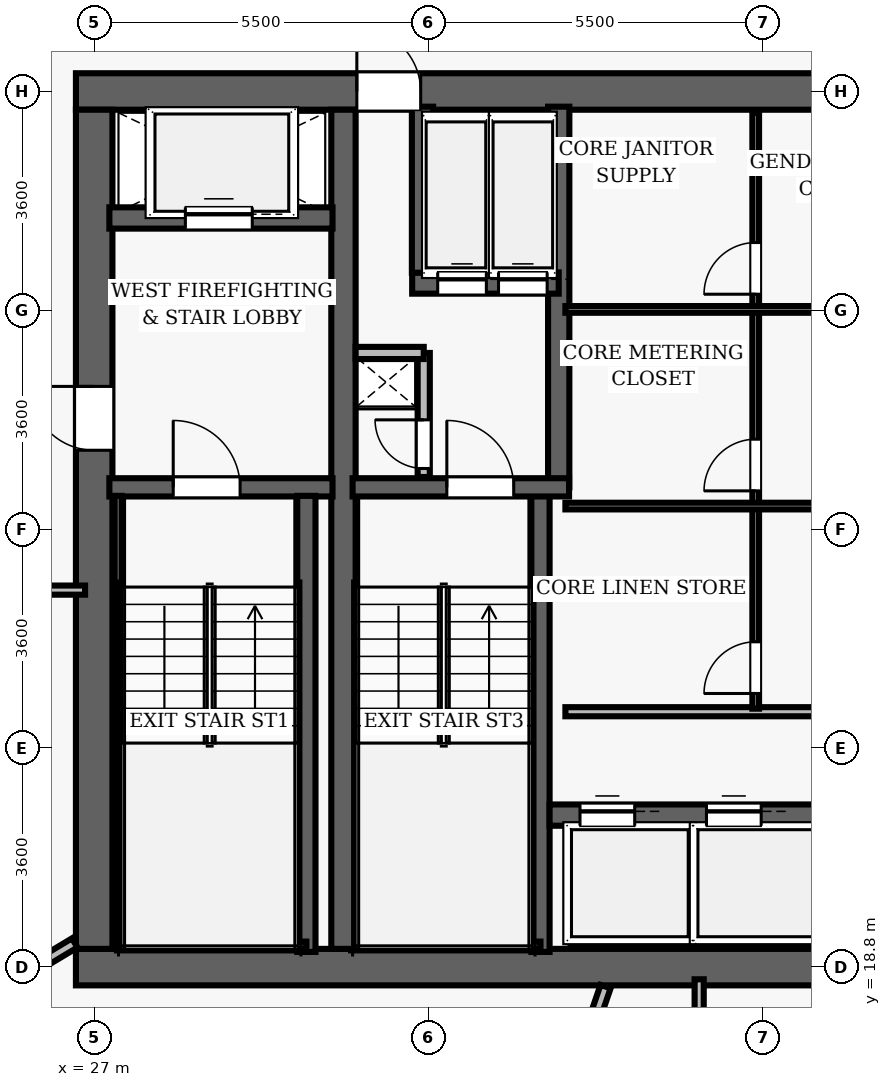
"""IFC4 building model, lengths in metres.
Left out: names, types, materials, properties, quantities, classifications, styles, units other than length and angle.
Written with IfcOpenShell. Run it as: python <this file> out.ifc"""

import sys

from ifc_helpers import new_model, si_unit, direction, frame, frame_2d, origin, place, context, subcontext, project, spatial, rectangle, extrude, element, fill, save


model = new_model("IFC4")
c1 = context("Model", 3, precision=1e-05, world=origin(), true_north=direction((0.0, 1.0)))
c2 = subcontext(c1, "Body", "Model", "MODEL_VIEW")
j1 = project(units=[si_unit("LENGTHUNIT", "METRE"), si_unit("PLANEANGLEUNIT", "RADIAN")], contexts=[c1])
p1 = place(None, origin())
s1 = spatial("IfcSite", under=j1, at=p1, CompositionType="ELEMENT")
p2 = place(p1, origin())
s2 = spatial("IfcBuilding", under=s1, at=p2, CompositionType="ELEMENT")
p3 = place(p2, frame((0.0, 0.0, 109.8)))
s3 = spatial("IfcBuildingStorey", under=s2, at=p3, CompositionType="ELEMENT", Elevation=109.8)
p4 = place(p3, frame((26.7, 18.8, 0.0), z_axis=(0.0, 0.0, 1.0), x_axis=(1.0, 0.0, 0.0)))
e1 = element("IfcWall", 1, at=p4, inside=s3, PredefinedType="SHEAR", context=c2, shape_type="SweptSolid", body=[
    extrude(rectangle(XDim=22.6, YDim=0.6, at=frame_2d((11.3, 0.0))), origin(), (0.0, 0.0, 1.0), 3.5),
])
p5 = place(p4, frame((14.52, 0.0, 0.0)))
e2 = element("IfcOpeningElement", 2, at=p5, cuts=e1, PredefinedType="OPENING", context=c2, shape_type="SweptSolid", body=[
    extrude(rectangle(XDim=1.05, YDim=2.15, at=frame_2d((0.525, 1.075))), frame((0.0, 0.31, 0.0), z_axis=(0.0, -1.0, 0.0), x_axis=(1.0, 0.0, 0.0)), (0.0, 0.0, 1.0), 0.62),
])
p6 = place(p3, frame((26.7, 33.2, 0.0), z_axis=(0.0, 0.0, 1.0), x_axis=(1.0, 0.0, 0.0)))
e3 = element("IfcWall", 3, at=p6, inside=s3, PredefinedType="SHEAR", context=c2, shape_type="SweptSolid", body=[
    extrude(rectangle(XDim=22.6, YDim=0.6, at=frame_2d((11.3, 0.0))), origin(), (0.0, 0.0, 1.0), 3.5),
])
p7 = place(p6, frame((4.62, 0.0, 0.0)))
e4 = element("IfcOpeningElement", 4, at=p7, cuts=e3, PredefinedType="OPENING", context=c2, shape_type="SweptSolid", body=[
    extrude(rectangle(XDim=1.05, YDim=2.15, at=frame_2d((0.525, 1.075))), frame((0.0, 0.31, 0.0), z_axis=(0.0, -1.0, 0.0), x_axis=(1.0, 0.0, 0.0)), (0.0, 0.0, 1.0), 0.62),
])
p8 = place(p6, frame((14.52, 0.0, 0.0)))
e5 = element("IfcOpeningElement", 5, at=p8, cuts=e3, PredefinedType="OPENING", context=c2, shape_type="SweptSolid", body=[
    extrude(rectangle(XDim=1.05, YDim=2.15, at=frame_2d((0.525, 1.075))), frame((0.0, 0.31, 0.0), z_axis=(0.0, -1.0, 0.0), x_axis=(1.0, 0.0, 0.0)), (0.0, 0.0, 1.0), 0.62),
])
p9 = place(p3, frame((27.0, 19.1, 0.0), z_axis=(0.0, 0.0, 1.0), x_axis=(0.0, 1.0, 0.0)))
e6 = element("IfcWall", 6, at=p9, inside=s3, PredefinedType="SHEAR", context=c2, shape_type="SweptSolid", body=[
    extrude(rectangle(XDim=13.8, YDim=0.6, at=frame_2d((6.9, 0.0))), origin(), (0.0, 0.0, 1.0), 3.5),
])
p10 = place(p9, frame((8.2, 0.0, 0.0)))
e7 = element("IfcOpeningElement", 7, at=p10, cuts=e6, PredefinedType="OPENING", context=c2, shape_type="SweptSolid", body=[
    extrude(rectangle(XDim=1.05, YDim=2.15, at=frame_2d((0.525, 1.075))), frame((0.0, 0.31, 0.0), z_axis=(0.0, -1.0, 0.0), x_axis=(1.0, 0.0, 0.0)), (0.0, 0.0, 1.0), 0.62),
])
p11 = place(p3, frame((31.1, 19.1, 0.0), z_axis=(0.0, 0.0, 1.0), x_axis=(0.0, 1.0, 0.0)))
e8 = element("IfcWall", 8, at=p11, inside=s3, PredefinedType="SHEAR", context=c2, shape_type="SweptSolid", body=[
    extrude(rectangle(XDim=13.8, YDim=0.4, at=frame_2d((6.9, 0.0))), origin(), (0.0, 0.0, 1.0), 3.5),
])
p12 = place(p3, frame((27.25, 26.69, 0.0), z_axis=(0.0, 0.0, 1.0), x_axis=(1.0, 0.0, 0.0)))
e9 = element("IfcWall", 9, at=p12, inside=s3, PredefinedType="SHEAR", context=c2, shape_type="SweptSolid", body=[
    extrude(rectangle(XDim=3.67, YDim=0.3, at=frame_2d((1.835, 0.0))), origin(), (0.0, 0.0, 1.0), 3.5),
])
p13 = place(p12, frame((1.05, 0.0, 0.0)))
e10 = element("IfcOpeningElement", 10, at=p13, cuts=e9, PredefinedType="OPENING", context=c2, shape_type="SweptSolid", body=[
    extrude(rectangle(XDim=1.1, YDim=2.15, at=frame_2d((0.55, 1.075))), frame((0.0, 0.16, 0.0), z_axis=(0.0, -1.0, 0.0), x_axis=(1.0, 0.0, 0.0)), (0.0, 0.0, 1.0), 0.32),
])
p14 = place(p3, frame((30.49, 19.05, 0.0), z_axis=(0.0, 0.0, 1.0), x_axis=(0.0, 1.0, 0.0)))
e11 = element("IfcWall", 11, at=p14, inside=s3, PredefinedType="SHEAR", context=c2, shape_type="SweptSolid", body=[
    extrude(rectangle(XDim=7.5, YDim=0.3, at=frame_2d((3.75, 0.0))), origin(), (0.0, 0.0, 1.0), 3.5),
])
p15 = place(p3, frame((27.395, 19.1, 0.0), z_axis=(0.0, 0.0, 1.0), x_axis=(0.0, 1.0, 0.0)))
e12 = element("IfcWall", 12, at=p15, inside=s3, PredefinedType="SHEAR", context=c2, shape_type="SweptSolid", body=[
    extrude(rectangle(XDim=7.45, YDim=0.12, at=frame_2d((3.725, 0.0))), origin(), (0.0, 0.0, 1.0), 3.5),
])
p16 = place(p3, frame((27.395, 19.16, 0.0), z_axis=(0.0, 0.0, 1.0), x_axis=(1.0, 0.0, 0.0)))
e13 = element("IfcWall", 13, at=p16, inside=s3, PredefinedType="SHEAR", context=c2, shape_type="SweptSolid", body=[
    extrude(rectangle(XDim=3.095, YDim=0.12, at=frame_2d((1.547, 0.0))), origin(), (0.0, 0.0, 1.0), 3.5),
])
p17 = place(p3, frame((27.25, 31.12, 0.0), z_axis=(0.0, 0.0, 1.0), x_axis=(1.0, 0.0, 0.0)))
e14 = element("IfcWall", 14, at=p17, inside=s3, PredefinedType="SHEAR", context=c2, shape_type="SweptSolid", body=[
    extrude(rectangle(XDim=3.67, YDim=0.35, at=frame_2d((1.835, 0.0))), origin(), (0.0, 0.0, 1.0), 2.675),
])
p18 = place(p17, frame((1.25, 0.0, 0.0)))
e15 = element("IfcOpeningElement", 15, at=p18, cuts=e14, PredefinedType="OPENING", context=c2, shape_type="SweptSolid", body=[
    extrude(rectangle(XDim=1.1, YDim=2.15, at=frame_2d((0.55, 1.075))), frame((0.0, 0.185, 0.0), z_axis=(0.0, -1.0, 0.0), x_axis=(1.0, 0.0, 0.0)), (0.0, 0.0, 1.0), 0.37),
])
p19 = place(p3, frame((34.34, 19.05, 0.0), z_axis=(0.0, 0.0, 1.0), x_axis=(0.0, 1.0, 0.0)))
e16 = element("IfcWall", 16, at=p19, inside=s3, PredefinedType="SHEAR", context=c2, shape_type="SweptSolid", body=[
    extrude(rectangle(XDim=7.5, YDim=0.3, at=frame_2d((3.75, 0.0))), origin(), (0.0, 0.0, 1.0), 3.5),
])
p20 = place(p3, frame((34.64, 26.69, 0.0), z_axis=(0.0, 0.0, 1.0), x_axis=(0.0, 1.0, 0.0)))
e17 = element("IfcWall", 17, at=p20, inside=s3, PredefinedType="SHEAR", context=c2, shape_type="SweptSolid", body=[
    extrude(rectangle(XDim=6.26, YDim=0.35, at=frame_2d((3.13, 0.0))), origin(), (0.0, 0.0, 1.0), 3.5),
])
p21 = place(p3, frame((31.25, 26.69, 0.0), z_axis=(0.0, 0.0, 1.0), x_axis=(1.0, 0.0, 0.0)))
e18 = element("IfcWall", 18, at=p21, inside=s3, PredefinedType="SHEAR", context=c2, shape_type="SweptSolid", body=[
    extrude(rectangle(XDim=3.56, YDim=0.3, at=frame_2d((1.78, 0.0))), origin(), (0.0, 0.0, 1.0), 3.5),
])
p22 = place(p21, frame((1.55, 0.0, 0.0)))
e19 = element("IfcOpeningElement", 19, at=p22, cuts=e18, PredefinedType="OPENING", context=c2, shape_type="SweptSolid", body=[
    extrude(rectangle(XDim=1.1, YDim=2.15, at=frame_2d((0.55, 1.075))), frame((0.0, 0.16, 0.0), z_axis=(0.0, -1.0, 0.0), x_axis=(1.0, 0.0, 0.0)), (0.0, 0.0, 1.0), 0.32),
])
p23 = place(p3, frame((31.3, 19.16, 0.0), z_axis=(0.0, 0.0, 1.0), x_axis=(1.0, 0.0, 0.0)))
e20 = element("IfcWall", 20, at=p23, inside=s3, PredefinedType="SHEAR", context=c2, shape_type="SweptSolid", body=[
    extrude(rectangle(XDim=3.04, YDim=0.12, at=frame_2d((1.52, 0.0))), origin(), (0.0, 0.0, 1.0), 3.5),
])
p24 = place(p3, frame((32.23, 30.05, 0.0), z_axis=(0.0, 0.0, 1.0), x_axis=(1.0, 0.0, 0.0)))
e21 = element("IfcWall", 21, at=p24, inside=s3, PredefinedType="SHEAR", context=c2, shape_type="SweptSolid", body=[
    extrude(rectangle(XDim=2.41, YDim=0.35, at=frame_2d((1.205, 0.0))), origin(), (0.0, 0.0, 1.0), 2.675),
])
p25 = place(p24, frame((0.42, 0.0, 0.0)))
e22 = element("IfcOpeningElement", 22, at=p25, cuts=e21, PredefinedType="OPENING", context=c2, shape_type="SweptSolid", body=[
    extrude(rectangle(XDim=0.8, YDim=2.15, at=frame_2d((0.4, 1.075))), frame((0.0, 0.185, 0.0), z_axis=(0.0, -1.0, 0.0), x_axis=(1.0, 0.0, 0.0)), (0.0, 0.0, 1.0), 0.37),
])
p26 = place(p24, frame((1.42, 0.0, 0.0)))
e23 = element("IfcOpeningElement", 23, at=p26, cuts=e21, PredefinedType="OPENING", context=c2, shape_type="SweptSolid", body=[
    extrude(rectangle(XDim=0.8, YDim=2.15, at=frame_2d((0.4, 1.075))), frame((0.0, 0.185, 0.0), z_axis=(0.0, -1.0, 0.0), x_axis=(1.0, 0.0, 0.0)), (0.0, 0.0, 1.0), 0.37),
])
p27 = place(p3, frame((32.4, 30.22, 0.0), z_axis=(0.0, 0.0, 1.0), x_axis=(0.0, 1.0, 0.0)))
e24 = element("IfcWall", 24, at=p27, inside=s3, PredefinedType="SHEAR", context=c2, shape_type="SweptSolid", body=[
    extrude(rectangle(XDim=2.73, YDim=0.35, at=frame_2d((1.365, 0.0))), origin(), (0.0, 0.0, 1.0), 2.675),
])
p28 = place(p3, frame((32.42, 26.86, 0.0), z_axis=(0.0, 0.0, 1.0), x_axis=(0.0, 1.0, 0.0)))
e25 = element("IfcWall", 25, at=p28, inside=s3, PredefinedType="PARTITIONING", context=c2, shape_type="SweptSolid", body=[
    extrude(rectangle(XDim=2.04, YDim=0.2, at=frame_2d((1.02, 0.0))), origin(), (0.0, 0.0, 1.0), 2.675),
])
p29 = place(p28, frame((0.14, 0.0, 0.0)))
e26 = element("IfcOpeningElement", 26, at=p29, cuts=e25, PredefinedType="OPENING", context=c2, shape_type="SweptSolid", body=[
    extrude(rectangle(XDim=0.8, YDim=2.05, at=frame_2d((0.4, 1.025))), frame((0.0, 0.11, 0.0), z_axis=(0.0, -1.0, 0.0), x_axis=(1.0, 0.0, 0.0)), (0.0, 0.0, 1.0), 0.22),
])
p30 = place(p3, frame((31.3, 28.9, 0.0), z_axis=(0.0, 0.0, 1.0), x_axis=(1.0, 0.0, 0.0)))
e27 = element("IfcWall", 27, at=p30, inside=s3, PredefinedType="PARTITIONING", context=c2, shape_type="SweptSolid", body=[
    extrude(rectangle(XDim=1.12, YDim=0.2, at=frame_2d((0.56, 0.0))), origin(), (0.0, 0.0, 1.0), 2.675),
])
p31 = place(p3, frame((34.49, 21.3, 0.0), z_axis=(0.0, 0.0, 1.0), x_axis=(1.0, 0.0, 0.0)))
e28 = element("IfcWall", 28, at=p31, inside=s3, PredefinedType="SHEAR", context=c2, shape_type="SweptSolid", body=[
    extrude(rectangle(XDim=6.68, YDim=0.35, at=frame_2d((3.34, 0.0))), origin(), (0.0, 0.0, 1.0), 2.675),
])
p32 = place(p31, frame((0.5, 0.0, 0.0)))
e29 = element("IfcOpeningElement", 29, at=p32, cuts=e28, PredefinedType="OPENING", context=c2, shape_type="SweptSolid", body=[
    extrude(rectangle(XDim=0.9, YDim=2.15, at=frame_2d((0.45, 1.075))), frame((0.0, 0.185, 0.0), z_axis=(0.0, -1.0, 0.0), x_axis=(1.0, 0.0, 0.0)), (0.0, 0.0, 1.0), 0.37),
])
p33 = place(p31, frame((2.58, 0.0, 0.0)))
e30 = element("IfcOpeningElement", 30, at=p33, cuts=e28, PredefinedType="OPENING", context=c2, shape_type="SweptSolid", body=[
    extrude(rectangle(XDim=0.9, YDim=2.15, at=frame_2d((0.45, 1.075))), frame((0.0, 0.185, 0.0), z_axis=(0.0, -1.0, 0.0), x_axis=(1.0, 0.0, 0.0)), (0.0, 0.0, 1.0), 0.37),
])
p34 = place(p31, frame((4.66, 0.0, 0.0)))
e31 = element("IfcOpeningElement", 31, at=p34, cuts=e28, PredefinedType="OPENING", context=c2, shape_type="SweptSolid", body=[
    extrude(rectangle(XDim=0.9, YDim=2.15, at=frame_2d((0.45, 1.075))), frame((0.0, 0.185, 0.0), z_axis=(0.0, -1.0, 0.0), x_axis=(1.0, 0.0, 0.0)), (0.0, 0.0, 1.0), 0.37),
])
p35 = place(p3, frame((34.75, 23.0, 0.0), z_axis=(0.0, 0.0, 1.0), x_axis=(1.0, 0.0, 0.0)))
e32 = element("IfcWall", 32, at=p35, inside=s3, PredefinedType="PARTITIONING", context=c2, shape_type="SweptSolid", body=[
    extrude(rectangle(XDim=6.25, YDim=0.15, at=frame_2d((3.125, 0.0))), origin(), (0.0, 0.0, 1.0), 2.675),
])
p36 = place(p3, frame((37.88, 23.05, 0.0), z_axis=(0.0, 0.0, 1.0), x_axis=(0.0, 1.0, 0.0)))
e33 = element("IfcWall", 33, at=p36, inside=s3, PredefinedType="PARTITIONING", context=c2, shape_type="SweptSolid", body=[
    extrude(rectangle(XDim=9.8, YDim=0.11, at=frame_2d((4.9, 0.0))), origin(), (0.0, 0.0, 1.0), 2.675),
])
p37 = place(p36, frame((0.25, 0.0, 0.0)))
e34 = element("IfcOpeningElement", 34, at=p37, cuts=e33, PredefinedType="OPENING", context=c2, shape_type="SweptSolid", body=[
    extrude(rectangle(XDim=0.85, YDim=2.1, at=frame_2d((0.425, 1.05))), frame((0.0, 0.065, 0.0), z_axis=(0.0, -1.0, 0.0), x_axis=(1.0, 0.0, 0.0)), (0.0, 0.0, 1.0), 0.13),
])
p38 = place(p36, frame((3.582, 0.0, 0.0)))
e35 = element("IfcOpeningElement", 35, at=p38, cuts=e33, PredefinedType="OPENING", context=c2, shape_type="SweptSolid", body=[
    extrude(rectangle(XDim=0.85, YDim=2.1, at=frame_2d((0.425, 1.05))), frame((0.0, 0.065, 0.0), z_axis=(0.0, -1.0, 0.0), x_axis=(1.0, 0.0, 0.0)), (0.0, 0.0, 1.0), 0.13),
])
p39 = place(p36, frame((6.816, 0.0, 0.0)))
e36 = element("IfcOpeningElement", 36, at=p39, cuts=e33, PredefinedType="OPENING", context=c2, shape_type="SweptSolid", body=[
    extrude(rectangle(XDim=0.85, YDim=2.1, at=frame_2d((0.425, 1.05))), frame((0.0, 0.065, 0.0), z_axis=(0.0, -1.0, 0.0), x_axis=(1.0, 0.0, 0.0)), (0.0, 0.0, 1.0), 0.13),
])
for number, where, z_axis, x_axis in (
    (37, (34.75, 26.382, 0.0), (0.0, 0.0, 1.0), (1.0, 0.0, 0.0)),
    (38, (34.75, 29.616, 0.0), (0.0, 0.0, 1.0), (1.0, 0.0, 0.0)),
):
    element("IfcWall", number, at=place(p3, frame(where, z_axis=z_axis, x_axis=x_axis)), inside=s3, PredefinedType="PARTITIONING", context=c2, shape_type="SweptSolid", body=[
        extrude(rectangle(XDim=6.25, YDim=0.11, at=frame_2d((3.125, 0.0))), origin(), (0.0, 0.0, 1.0), 2.675),
    ])
p40 = place(p3, frame((14.5, 25.0, 0.0), z_axis=(0.0, 0.0, 1.0), x_axis=(1.0, 0.0, 0.0)))
e39 = element("IfcWall", 39, at=p40, inside=s3, PredefinedType="PARTITIONING", context=c2, shape_type="SweptSolid", body=[
    extrude(rectangle(XDim=12.35, YDim=0.15, at=frame_2d((6.175, 0.0))), origin(), (0.0, 0.0, 1.0), 2.675),
])
p41 = place(p40, frame((8.788, 0.0, 0.0)))
e40 = element("IfcOpeningElement", 40, at=p41, cuts=e39, PredefinedType="OPENING", context=c2, shape_type="SweptSolid", body=[
    extrude(rectangle(XDim=0.95, YDim=2.15, at=frame_2d((0.475, 1.075))), frame((0.0, 0.085, 0.0), z_axis=(0.0, -1.0, 0.0), x_axis=(1.0, 0.0, 0.0)), (0.0, 0.0, 1.0), 0.17),
])
p42 = place(p3, frame((36.95, 11.2, 0.0), z_axis=(0.0, 0.0, 1.0), x_axis=(0.0, 1.0, 0.0)))
e41 = element("IfcWall", 41, at=p42, inside=s3, PredefinedType="PARTITIONING", context=c2, shape_type="SweptSolid", body=[
    extrude(rectangle(XDim=7.4, YDim=0.15, at=frame_2d((3.7, 0.0))), origin(), (0.0, 0.0, 1.0), 2.675),
])
p43 = place(p42, frame((5.075, 0.0, 0.0)))
e42 = element("IfcOpeningElement", 42, at=p43, cuts=e41, PredefinedType="OPENING", context=c2, shape_type="SweptSolid", body=[
    extrude(rectangle(XDim=0.95, YDim=2.15, at=frame_2d((0.475, 1.075))), frame((0.0, 0.085, 0.0), z_axis=(0.0, -1.0, 0.0), x_axis=(1.0, 0.0, 0.0)), (0.0, 0.0, 1.0), 0.17),
])
p44 = place(p3, frame((26.68, 19.198, 0.0), z_axis=(0.0, 0.0, 1.0), x_axis=(-0.857163158483, -0.515044968657, 0.0)))
e43 = element("IfcWall", 43, at=p44, inside=s3, PredefinedType="PARTITIONING", context=c2, shape_type="SweptSolid", body=[
    extrude(rectangle(XDim=11.765, YDim=0.175, at=frame_2d((5.882, 0.0))), origin(), (0.0, 0.0, 1.0), 2.675),
])
p45 = place(p3, frame((35.411, 18.48, 0.0), z_axis=(0.0, 0.0, 1.0), x_axis=(-0.32557542386, -0.945516072512, 0.0)))
e44 = element("IfcWall", 44, at=p45, inside=s3, PredefinedType="PARTITIONING", context=c2, shape_type="SweptSolid", body=[
    extrude(rectangle(XDim=15.003, YDim=0.175, at=frame_2d((7.502, 0.0))), origin(), (0.0, 0.0, 1.0), 2.675),
])
p46 = place(p13, origin())
e45 = element("IfcDoor", 45, at=p46, inside=s3, OperationType="SINGLE_SWING_LEFT", PredefinedType="DOOR", context=c2, shape_type="SweptSolid", body=[
    extrude(rectangle(XDim=1.1, YDim=2.15, at=frame_2d((0.55, 1.075))), frame((0.0, 0.025, 0.0), z_axis=(0.0, -1.0, 0.0), x_axis=(1.0, 0.0, 0.0)), (0.0, 0.0, 1.0), 0.05),
])
fill(e10, e45)
p47 = place(p10, origin())
e46 = element("IfcDoor", 46, at=p47, inside=s3, OperationType="SINGLE_SWING_RIGHT", PredefinedType="DOOR", context=c2, shape_type="SweptSolid", body=[
    extrude(rectangle(XDim=1.05, YDim=2.15, at=frame_2d((0.525, 1.075))), frame((0.0, 0.025, 0.0), z_axis=(0.0, -1.0, 0.0), x_axis=(1.0, 0.0, 0.0)), (0.0, 0.0, 1.0), 0.05),
])
fill(e7, e46)
p48 = place(p22, origin())
e47 = element("IfcDoor", 47, at=p48, inside=s3, OperationType="SINGLE_SWING_LEFT", PredefinedType="DOOR", context=c2, shape_type="SweptSolid", body=[
    extrude(rectangle(XDim=1.1, YDim=2.15, at=frame_2d((0.55, 1.075))), frame((0.0, 0.025, 0.0), z_axis=(0.0, -1.0, 0.0), x_axis=(1.0, 0.0, 0.0)), (0.0, 0.0, 1.0), 0.05),
])
fill(e19, e47)
p49 = place(p29, origin())
e48 = element("IfcDoor", 48, at=p49, inside=s3, OperationType="SINGLE_SWING_RIGHT", PredefinedType="DOOR", context=c2, shape_type="SweptSolid", body=[
    extrude(rectangle(XDim=0.8, YDim=2.05, at=frame_2d((0.4, 1.025))), frame((0.0, 0.025, 0.0), z_axis=(0.0, -1.0, 0.0), x_axis=(1.0, 0.0, 0.0)), (0.0, 0.0, 1.0), 0.05),
])
fill(e26, e48)
p50 = place(p7, origin())
e49 = element("IfcDoor", 49, at=p50, inside=s3, OperationType="SINGLE_SWING_LEFT", PredefinedType="DOOR", context=c2, shape_type="SweptSolid", body=[
    extrude(rectangle(XDim=1.05, YDim=2.15, at=frame_2d((0.525, 1.075))), frame((0.0, 0.025, 0.0), z_axis=(0.0, -1.0, 0.0), x_axis=(1.0, 0.0, 0.0)), (0.0, 0.0, 1.0), 0.05),
])
fill(e4, e49)
p51 = place(p37, origin())
e50 = element("IfcDoor", 50, at=p51, inside=s3, OperationType="SINGLE_SWING_LEFT", PredefinedType="DOOR", context=c2, shape_type="SweptSolid", body=[
    extrude(rectangle(XDim=0.85, YDim=2.1, at=frame_2d((0.425, 1.05))), frame((0.0, 0.025, 0.0), z_axis=(0.0, -1.0, 0.0), x_axis=(1.0, 0.0, 0.0)), (0.0, 0.0, 1.0), 0.05),
])
fill(e34, e50)
p52 = place(p38, origin())
e51 = element("IfcDoor", 51, at=p52, inside=s3, OperationType="SINGLE_SWING_LEFT", PredefinedType="DOOR", context=c2, shape_type="SweptSolid", body=[
    extrude(rectangle(XDim=0.85, YDim=2.1, at=frame_2d((0.425, 1.05))), frame((0.0, 0.025, 0.0), z_axis=(0.0, -1.0, 0.0), x_axis=(1.0, 0.0, 0.0)), (0.0, 0.0, 1.0), 0.05),
])
fill(e35, e51)
p53 = place(p39, origin())
e52 = element("IfcDoor", 52, at=p53, inside=s3, OperationType="SINGLE_SWING_LEFT", PredefinedType="DOOR", context=c2, shape_type="SweptSolid", body=[
    extrude(rectangle(XDim=0.85, YDim=2.1, at=frame_2d((0.425, 1.05))), frame((0.0, 0.025, 0.0), z_axis=(0.0, -1.0, 0.0), x_axis=(1.0, 0.0, 0.0)), (0.0, 0.0, 1.0), 0.05),
])
fill(e36, e52)
p54 = place(p32, origin())
e53 = element("IfcDoor", 53, at=p54, inside=s3, OperationType="SLIDING_TO_LEFT", PredefinedType="DOOR", context=c2, shape_type="SweptSolid", body=[
    extrude(rectangle(XDim=0.9, YDim=2.15, at=frame_2d((0.45, 1.075))), frame((0.0, 0.025, 0.0), z_axis=(0.0, -1.0, 0.0), x_axis=(1.0, 0.0, 0.0)), (0.0, 0.0, 1.0), 0.05),
])
fill(e29, e53)
p55 = place(p33, origin())
e54 = element("IfcDoor", 54, at=p55, inside=s3, OperationType="SLIDING_TO_LEFT", PredefinedType="DOOR", context=c2, shape_type="SweptSolid", body=[
    extrude(rectangle(XDim=0.9, YDim=2.15, at=frame_2d((0.45, 1.075))), frame((0.0, 0.025, 0.0), z_axis=(0.0, -1.0, 0.0), x_axis=(1.0, 0.0, 0.0)), (0.0, 0.0, 1.0), 0.05),
])
fill(e30, e54)
p56 = place(p18, origin())
e55 = element("IfcDoor", 55, at=p56, inside=s3, OperationType="SLIDING_TO_LEFT", PredefinedType="DOOR", context=c2, shape_type="SweptSolid", body=[
    extrude(rectangle(XDim=1.1, YDim=2.15, at=frame_2d((0.55, 1.075))), frame((0.0, 0.025, 0.0), z_axis=(0.0, -1.0, 0.0), x_axis=(1.0, 0.0, 0.0)), (0.0, 0.0, 1.0), 0.05),
])
fill(e15, e55)
p57 = place(p25, origin())
e56 = element("IfcDoor", 56, at=p57, inside=s3, OperationType="SLIDING_TO_LEFT", PredefinedType="DOOR", context=c2, shape_type="SweptSolid", body=[
    extrude(rectangle(XDim=0.8, YDim=2.15, at=frame_2d((0.4, 1.075))), frame((0.0, 0.025, 0.0), z_axis=(0.0, -1.0, 0.0), x_axis=(1.0, 0.0, 0.0)), (0.0, 0.0, 1.0), 0.05),
])
fill(e22, e56)
p58 = place(p26, origin())
e57 = element("IfcDoor", 57, at=p58, inside=s3, OperationType="SLIDING_TO_LEFT", PredefinedType="DOOR", context=c2, shape_type="SweptSolid", body=[
    extrude(rectangle(XDim=0.8, YDim=2.15, at=frame_2d((0.4, 1.075))), frame((0.0, 0.025, 0.0), z_axis=(0.0, -1.0, 0.0), x_axis=(1.0, 0.0, 0.0)), (0.0, 0.0, 1.0), 0.05),
])
fill(e23, e57)
save(model, sys.argv[1])
